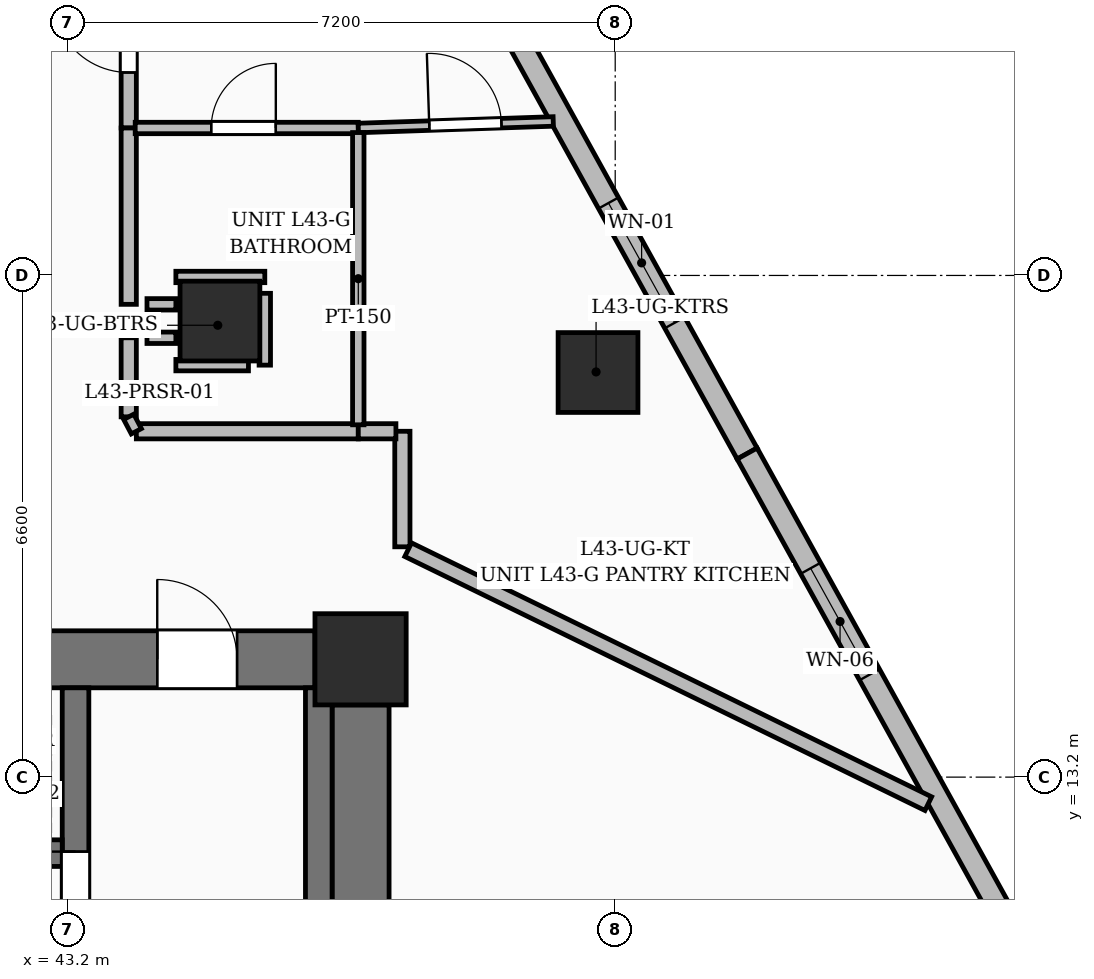
"""IFC4 building model, lengths in metres.
Left out: names, types, materials, properties, quantities, classifications, styles, units other than length and angle.
Written with IfcOpenShell. Run it as: python <this file> out.ifc"""

import sys

from ifc_helpers import new_model, si_unit, direction, frame, frame_2d, origin, origin_2d, place, context, subcontext, project, spatial, rectangle, extrude, element, fill, save


model = new_model("IFC4")
c1 = context("Model", 3, precision=1e-05, world=origin(), true_north=direction((0.0, 1.0)))
c2 = subcontext(c1, "Body", "Model", "MODEL_VIEW")
j1 = project(units=[si_unit("LENGTHUNIT", "METRE"), si_unit("PLANEANGLEUNIT", "RADIAN")], contexts=[c1])
p1 = place(None, origin())
s1 = spatial("IfcSite", under=j1, at=p1, CompositionType="ELEMENT")
p2 = place(p1, origin())
s2 = spatial("IfcBuilding", under=s1, at=p2, CompositionType="ELEMENT")
p3 = place(p2, frame((0.0, 0.0, 168.0)))
s3 = spatial("IfcBuildingStorey", under=s2, at=p3, CompositionType="ELEMENT", Elevation=168.0)
p4 = place(p3, frame((47.05, 14.75, 0.0), z_axis=(0.0, 0.0, 1.0), x_axis=(1.0, 0.0, 0.0)))
e1 = element("IfcColumn", 1, at=p4, inside=s3, PredefinedType="COLUMN", context=c2, shape_type="SweptSolid", body=[
    extrude(rectangle(XDim=1.2, YDim=1.2, at=origin_2d()), origin(), (0.0, 0.0, 1.0), 3.6),
])
p5 = place(p3, frame((45.2, 19.2, 0.0), z_axis=(0.0, 0.0, 1.0), x_axis=(1.0, 0.0, 0.0)))
e2 = element("IfcColumn", 2, at=p5, inside=s3, PredefinedType="COLUMN", context=c2, shape_type="SweptSolid", body=[
    extrude(rectangle(XDim=1.05, YDim=1.05, at=origin_2d()), origin(), (0.0, 0.0, 1.0), 3.6),
])
p6 = place(p3, frame((35.75, 14.75, 0.0), z_axis=(0.0, 0.0, 1.0), x_axis=(1.0, 0.0, 0.0)))
e3 = element("IfcWall", 3, at=p6, inside=s3, PredefinedType="SHEAR", context=c2, shape_type="SweptSolid", body=[
    extrude(rectangle(XDim=10.7, YDim=0.75, at=frame_2d((5.35, 0.0))), origin(), (0.0, 0.0, 1.0), 3.6),
])
p7 = place(p6, frame((1.025, 0.0, 0.0)))
e4 = element("IfcOpeningElement", 4, at=p7, cuts=e3, PredefinedType="OPENING", context=c2, shape_type="SweptSolid", body=[
    extrude(rectangle(XDim=1.05, YDim=2.15, at=frame_2d((0.525, 1.075))), frame((0.0, 0.385, 0.0), z_axis=(0.0, -1.0, 0.0), x_axis=(1.0, 0.0, 0.0)), (0.0, 0.0, 1.0), 0.77),
])
p8 = place(p6, frame((8.625, 0.0, 0.0)))
e5 = element("IfcOpeningElement", 5, at=p8, cuts=e3, PredefinedType="OPENING", context=c2, shape_type="SweptSolid", body=[
    extrude(rectangle(XDim=1.05, YDim=2.15, at=frame_2d((0.525, 1.075))), frame((0.0, 0.385, 0.0), z_axis=(0.0, -1.0, 0.0), x_axis=(1.0, 0.0, 0.0)), (0.0, 0.0, 1.0), 0.77),
])
p9 = place(p3, frame((47.05, 5.15, 0.0), z_axis=(0.0, 0.0, 1.0), x_axis=(0.0, 1.0, 0.0)))
e6 = element("IfcWall", 6, at=p9, inside=s3, PredefinedType="SHEAR", context=c2, shape_type="SweptSolid", body=[
    extrude(rectangle(XDim=9.0, YDim=0.75, at=frame_2d((4.5, 0.0))), origin(), (0.0, 0.0, 1.0), 3.6),
])
p10 = place(p3, frame((43.3, 5.2, 0.0), z_axis=(0.0, 0.0, 1.0), x_axis=(0.0, 1.0, 0.0)))
e7 = element("IfcWall", 7, at=p10, inside=s3, PredefinedType="SOLIDWALL", context=c2, shape_type="SweptSolid", body=[
    extrude(rectangle(XDim=9.175, YDim=0.35, at=frame_2d((4.587, 0.0))), origin(), (0.0, 0.0, 1.0), 3.6),
])
p11 = place(p10, frame((6.02, 0.0, 0.0)))
e8 = element("IfcOpeningElement", 8, at=p11, cuts=e7, PredefinedType="OPENING", context=c2, shape_type="SweptSolid", body=[
    extrude(rectangle(XDim=1.0, YDim=2.15, at=frame_2d((0.5, 1.075))), frame((0.0, 0.185, 0.0), z_axis=(0.0, -1.0, 0.0), x_axis=(1.0, 0.0, 0.0)), (0.0, 0.0, 1.0), 0.37),
])
p12 = place(p3, frame((46.5, 5.2, 0.0), z_axis=(0.0, 0.0, 1.0), x_axis=(0.0, 1.0, 0.0)))
e9 = element("IfcWall", 9, at=p12, inside=s3, PredefinedType="SOLIDWALL", context=c2, shape_type="SweptSolid", body=[
    extrude(rectangle(XDim=9.175, YDim=0.35, at=frame_2d((4.587, 0.0))), origin(), (0.0, 0.0, 1.0), 3.6),
])
p13 = place(p3, frame((39.075, 12.2, 0.0), z_axis=(0.0, 0.0, 1.0), x_axis=(1.0, 0.0, 0.0)))
e10 = element("IfcWall", 10, at=p13, inside=s3, PredefinedType="SOLIDWALL", context=c2, shape_type="SweptSolid", body=[
    extrude(rectangle(XDim=4.05, YDim=0.35, at=frame_2d((2.025, 0.0))), origin(), (0.0, 0.0, 1.0), 3.6),
])
p14 = place(p3, frame((50.174, 18.523, 0.0), z_axis=(0.0, 0.0, 1.0), x_axis=(1.0, 0.0, 0.0)))
e11 = element("IfcColumn", 11, at=p14, inside=s3, PredefinedType="COLUMN", context=c2, shape_type="SweptSolid", body=[
    extrude(rectangle(XDim=1.05, YDim=1.05, at=origin_2d()), origin(), (0.0, 0.0, 1.0), 3.6),
])
p15 = place(p3, frame((48.871, 23.356, 0.0), z_axis=(0.0, 0.0, 1.0), x_axis=(0.484178775102, -0.874969093021, 0.0)))
e12 = element("IfcWall", 12, at=p15, inside=s3, PredefinedType="SOLIDWALL", context=c2, shape_type="SweptSolid", body=[
    extrude(rectangle(XDim=6.742, YDim=0.3, at=frame_2d((3.371, 0.0))), origin(), (0.0, 0.0, 1.0), 3.35),
])
p16 = place(p15, frame((2.975, 0.0, 0.6)))
e13 = element("IfcOpeningElement", 13, at=p16, cuts=e12, PredefinedType="OPENING", context=c2, shape_type="SweptSolid", body=[
    extrude(rectangle(XDim=1.8, YDim=2.1, at=frame_2d((0.9, 1.05))), frame((0.0, 0.16, 0.0), z_axis=(0.0, -1.0, 0.0), x_axis=(1.0, 0.0, 0.0)), (0.0, 0.0, 1.0), 0.32),
])
p17 = place(p3, frame((52.136, 17.457, 0.0), z_axis=(0.0, 0.0, 1.0), x_axis=(0.484177011321, -0.874970069036, 0.0)))
e14 = element("IfcWall", 14, at=p17, inside=s3, PredefinedType="SOLIDWALL", context=c2, shape_type="SweptSolid", body=[
    extrude(rectangle(XDim=7.017, YDim=0.3, at=frame_2d((3.509, 0.0))), origin(), (0.0, 0.0, 1.0), 3.35),
])
p18 = place(p17, frame((1.725, 0.0, 0.55)))
e15 = element("IfcOpeningElement", 15, at=p18, cuts=e14, PredefinedType="OPENING", context=c2, shape_type="SweptSolid", body=[
    extrude(rectangle(XDim=1.6, YDim=2.2, at=frame_2d((0.8, 1.1))), frame((0.0, 0.16, 0.0), z_axis=(0.0, -1.0, 0.0), x_axis=(1.0, 0.0, 0.0)), (0.0, 0.0, 1.0), 0.32),
])
p19 = place(p3, frame((44.0, 21.74, 0.0), z_axis=(0.0, 0.0, 1.0), x_axis=(0.0, 1.0, 0.0)))
e16 = element("IfcWall", 16, at=p19, inside=s3, PredefinedType="PARTITIONING", context=c2, shape_type="SweptSolid", body=[
    extrude(rectangle(XDim=2.46, YDim=0.2, at=frame_2d((1.23, 0.0))), origin(), (0.0, 0.0, 1.0), 2.436),
])
p20 = place(p19, frame((0.73, 0.0, 0.0)))
e17 = element("IfcOpeningElement", 17, at=p20, cuts=e16, PredefinedType="OPENING", context=c2, shape_type="SweptSolid", body=[
    extrude(rectangle(XDim=1.0, YDim=2.2, at=frame_2d((0.5, 1.1))), frame((0.0, 0.11, 0.0), z_axis=(0.0, -1.0, 0.0), x_axis=(1.0, 0.0, 0.0)), (0.0, 0.0, 1.0), 0.22),
])
p21 = place(p3, frame((44.0, 17.94, 0.0), z_axis=(0.0, 0.0, 1.0), x_axis=(0.0, 1.0, 0.0)))
e18 = element("IfcWall", 18, at=p21, inside=s3, PredefinedType="PARTITIONING", context=c2, shape_type="SweptSolid", body=[
    extrude(rectangle(XDim=1.04, YDim=0.2, at=frame_2d((0.52, 0.0))), origin(), (0.0, 0.0, 1.0), 3.35),
])
p22 = place(p3, frame((44.0, 19.42, 0.0), z_axis=(0.0, 0.0, 1.0), x_axis=(0.0, 1.0, 0.0)))
e19 = element("IfcWall", 19, at=p22, inside=s3, PredefinedType="PARTITIONING", context=c2, shape_type="SweptSolid", body=[
    extrude(rectangle(XDim=2.32, YDim=0.2, at=frame_2d((1.16, 0.0))), origin(), (0.0, 0.0, 1.0), 3.35),
])
p23 = place(p3, frame((47.02, 17.75, 0.0), z_axis=(0.0, 0.0, 1.0), x_axis=(-1.0, 0.0, 0.0)))
e20 = element("IfcWall", 20, at=p23, inside=s3, PredefinedType="PARTITIONING", context=c2, shape_type="SweptSolid", body=[
    extrude(rectangle(XDim=2.92, YDim=0.2, at=frame_2d((1.46, 0.0))), origin(), (0.0, 0.0, 1.0), 2.436),
])
p24 = place(p3, frame((47.6, 16.23, 0.0), z_axis=(0.0, 0.0, 1.0), x_axis=(0.0, 1.0, 0.0)))
e21 = element("IfcWall", 21, at=p24, inside=s3, PredefinedType="PARTITIONING", context=c2, shape_type="SweptSolid", body=[
    extrude(rectangle(XDim=1.52, YDim=0.2, at=frame_2d((0.76, 0.0))), origin(), (0.0, 0.0, 1.0), 2.771),
])
p25 = place(p3, frame((47.515, 17.75, 0.0), z_axis=(0.0, 0.0, 1.0), x_axis=(-1.0, 0.0, 0.0)))
e22 = element("IfcWall", 22, at=p25, inside=s3, PredefinedType="PARTITIONING", context=c2, shape_type="SweptSolid", body=[
    extrude(rectangle(XDim=0.495, YDim=0.2, at=frame_2d((0.248, 0.0))), origin(), (0.0, 0.0, 1.0), 2.771),
])
p26 = place(p3, frame((54.519, 12.851, 0.0), z_axis=(0.0, 0.0, 1.0), x_axis=(-0.898612787357, 0.438742587855, 0.0)))
e23 = element("IfcWall", 23, at=p26, inside=s3, PredefinedType="PARTITIONING", context=c2, shape_type="SweptSolid", body=[
    extrude(rectangle(XDim=7.615, YDim=0.2, at=frame_2d((3.808, 0.0))), origin(), (0.0, 0.0, 1.0), 2.393),
])
p27 = place(p3, frame((44.085, 21.74, 0.0), z_axis=(0.0, 0.0, 1.0), x_axis=(1.0, 0.0, 0.0)))
e24 = element("IfcWall", 24, at=p27, inside=s3, PredefinedType="PARTITIONING", context=c2, shape_type="SweptSolid", body=[
    extrude(rectangle(XDim=2.935, YDim=0.15, at=frame_2d((1.468, 0.0))), origin(), (0.0, 0.0, 1.0), 2.393),
])
p28 = place(p27, frame((1.0, 0.0, 0.0)))
e25 = element("IfcOpeningElement", 25, at=p28, cuts=e24, PredefinedType="OPENING", context=c2, shape_type="SweptSolid", body=[
    extrude(rectangle(XDim=0.85, YDim=2.1, at=frame_2d((0.425, 1.05))), frame((0.0, 0.085, 0.0), z_axis=(0.0, -1.0, 0.0), x_axis=(1.0, 0.0, 0.0)), (0.0, 0.0, 1.0), 0.17),
])
p29 = place(p3, frame((47.02, 21.74, 0.0), z_axis=(0.0, 0.0, 1.0), x_axis=(0.999439190858, 0.03348587428, 0.0)))
e26 = element("IfcWall", 26, at=p29, inside=s3, PredefinedType="PARTITIONING", context=c2, shape_type="SweptSolid", body=[
    extrude(rectangle(XDim=2.566, YDim=0.125, at=frame_2d((1.283, 0.0))), origin(), (0.0, 0.0, 1.0), 2.57),
])
p30 = place(p29, frame((0.934, 0.0, 0.0)))
e27 = element("IfcOpeningElement", 27, at=p30, cuts=e26, PredefinedType="OPENING", context=c2, shape_type="SweptSolid", body=[
    extrude(rectangle(XDim=0.95, YDim=2.2, at=frame_2d((0.475, 1.1))), frame((0.0, 0.072, 0.0), z_axis=(0.0, -1.0, 0.0), x_axis=(1.0, 0.0, 0.0)), (0.0, 0.0, 1.0), 0.145),
])
p31 = place(p3, frame((47.02, 17.835, 0.0), z_axis=(0.0, 0.0, 1.0), x_axis=(0.0, 1.0, 0.0)))
e28 = element("IfcWall", 28, at=p31, inside=s3, PredefinedType="PARTITIONING", context=c2, shape_type="SweptSolid", body=[
    extrude(rectangle(XDim=3.845, YDim=0.15, at=frame_2d((1.922, 0.0))), origin(), (0.0, 0.0, 1.0), 2.771),
])
p32 = place(p3, frame((44.24, 19.42, 0.0), z_axis=(0.0, 0.0, 1.0), x_axis=(1.0, 0.0, 0.0)))
e29 = element("IfcWall", 29, at=p32, inside=s3, PredefinedType="PARTITIONING", context=c2, shape_type="SweptSolid", body=[
    extrude(rectangle(XDim=0.38, YDim=0.15, at=frame_2d((0.19, 0.0))), origin(), (0.0, 0.0, 1.0), 3.35),
])
p33 = place(p3, frame((44.62, 19.78, 0.0), z_axis=(0.0, 0.0, 1.0), x_axis=(1.0, 0.0, 0.0)))
e30 = element("IfcWall", 30, at=p33, inside=s3, PredefinedType="PARTITIONING", context=c2, shape_type="SweptSolid", body=[
    extrude(rectangle(XDim=1.17, YDim=0.15, at=frame_2d((0.585, 0.0))), origin(), (0.0, 0.0, 1.0), 2.393),
])
p34 = place(p3, frame((45.79, 19.565, 0.0), z_axis=(0.0, 0.0, 1.0), x_axis=(0.0, -1.0, 0.0)))
e31 = element("IfcWall", 31, at=p34, inside=s3, PredefinedType="PARTITIONING", context=c2, shape_type="SweptSolid", body=[
    extrude(rectangle(XDim=0.945, YDim=0.15, at=frame_2d((0.472, 0.0))), origin(), (0.0, 0.0, 1.0), 3.35),
])
p35 = place(p3, frame((45.575, 18.62, 0.0), z_axis=(0.0, 0.0, 1.0), x_axis=(-1.0, 0.0, 0.0)))
e32 = element("IfcWall", 32, at=p35, inside=s3, PredefinedType="PARTITIONING", context=c2, shape_type="SweptSolid", body=[
    extrude(rectangle(XDim=0.955, YDim=0.15, at=frame_2d((0.478, 0.0))), origin(), (0.0, 0.0, 1.0), 2.436),
])
p36 = place(p3, frame((44.62, 18.98, 0.0), z_axis=(0.0, 0.0, 1.0), x_axis=(-1.0, 0.0, 0.0)))
e33 = element("IfcWall", 33, at=p36, inside=s3, PredefinedType="PARTITIONING", context=c2, shape_type="SweptSolid", body=[
    extrude(rectangle(XDim=0.38, YDim=0.15, at=frame_2d((0.19, 0.0))), origin(), (0.0, 0.0, 1.0), 3.35),
])
p37 = place(p3, frame((44.0, 17.94, 0.0), z_axis=(0.0, 0.0, 1.0), x_axis=(0.46621502449, -0.884671436715, 0.0)))
e34 = element("IfcWall", 34, at=p37, inside=s3, PredefinedType="PARTITIONING", context=c2, shape_type="SweptSolid", body=[
    extrude(rectangle(XDim=0.215, YDim=0.15, at=frame_2d((0.107, 0.0))), origin(), (0.0, 0.0, 1.0), 3.35),
])
p38 = place(p16, origin())
e35 = element("IfcWindow", 35, at=p38, inside=s3, PartitioningType="SINGLE_PANEL", PredefinedType="WINDOW", context=c2, shape_type="SweptSolid", body=[
    extrude(rectangle(XDim=1.8, YDim=2.1, at=frame_2d((0.9, 1.05))), frame((0.0, 0.03, 0.0), z_axis=(0.0, -1.0, 0.0), x_axis=(1.0, 0.0, 0.0)), (0.0, 0.0, 1.0), 0.06),
])
fill(e13, e35)
p39 = place(p18, origin())
e36 = element("IfcWindow", 36, at=p39, inside=s3, PartitioningType="SINGLE_PANEL", PredefinedType="WINDOW", context=c2, shape_type="SweptSolid", body=[
    extrude(rectangle(XDim=1.6, YDim=2.2, at=frame_2d((0.8, 1.1))), frame((0.0, 0.03, 0.0), z_axis=(0.0, -1.0, 0.0), x_axis=(1.0, 0.0, 0.0)), (0.0, 0.0, 1.0), 0.06),
])
fill(e15, e36)
p40 = place(p8, origin())
e37 = element("IfcDoor", 37, at=p40, inside=s3, OperationType="SINGLE_SWING_LEFT", PredefinedType="DOOR", context=c2, shape_type="SweptSolid", body=[
    extrude(rectangle(XDim=1.05, YDim=2.15, at=frame_2d((0.525, 1.075))), frame((0.0, 0.025, 0.0), z_axis=(0.0, -1.0, 0.0), x_axis=(1.0, 0.0, 0.0)), (0.0, 0.0, 1.0), 0.05),
])
fill(e5, e37)
p41 = place(p11, origin())
e38 = element("IfcDoor", 38, at=p41, inside=s3, OperationType="SINGLE_SWING_RIGHT", PredefinedType="DOOR", context=c2, shape_type="SweptSolid", body=[
    extrude(rectangle(XDim=1.0, YDim=2.15, at=frame_2d((0.5, 1.075))), frame((0.0, 0.025, 0.0), z_axis=(0.0, -1.0, 0.0), x_axis=(1.0, 0.0, 0.0)), (0.0, 0.0, 1.0), 0.05),
])
fill(e8, e38)
p42 = place(p20, origin())
e39 = element("IfcDoor", 39, at=p42, inside=s3, OperationType="SINGLE_SWING_RIGHT", PredefinedType="DOOR", context=c2, shape_type="SweptSolid", body=[
    extrude(rectangle(XDim=1.0, YDim=2.2, at=frame_2d((0.5, 1.1))), frame((0.0, 0.025, 0.0), z_axis=(0.0, -1.0, 0.0), x_axis=(1.0, 0.0, 0.0)), (0.0, 0.0, 1.0), 0.05),
])
fill(e17, e39)
p43 = place(p30, origin())
e40 = element("IfcDoor", 40, at=p43, inside=s3, OperationType="SINGLE_SWING_LEFT", PredefinedType="DOOR", context=c2, shape_type="SweptSolid", body=[
    extrude(rectangle(XDim=0.95, YDim=2.2, at=frame_2d((0.475, 1.1))), frame((0.0, 0.025, 0.0), z_axis=(0.0, -1.0, 0.0), x_axis=(1.0, 0.0, 0.0)), (0.0, 0.0, 1.0), 0.05),
])
fill(e27, e40)
p44 = place(p28, origin())
e41 = element("IfcDoor", 41, at=p44, inside=s3, OperationType="SINGLE_SWING_RIGHT", PredefinedType="DOOR", context=c2, shape_type="SweptSolid", body=[
    extrude(rectangle(XDim=0.85, YDim=2.1, at=frame_2d((0.425, 1.05))), frame((0.0, 0.025, 0.0), z_axis=(0.0, -1.0, 0.0), x_axis=(1.0, 0.0, 0.0)), (0.0, 0.0, 1.0), 0.05),
])
fill(e25, e41)
save(model, sys.argv[1])
